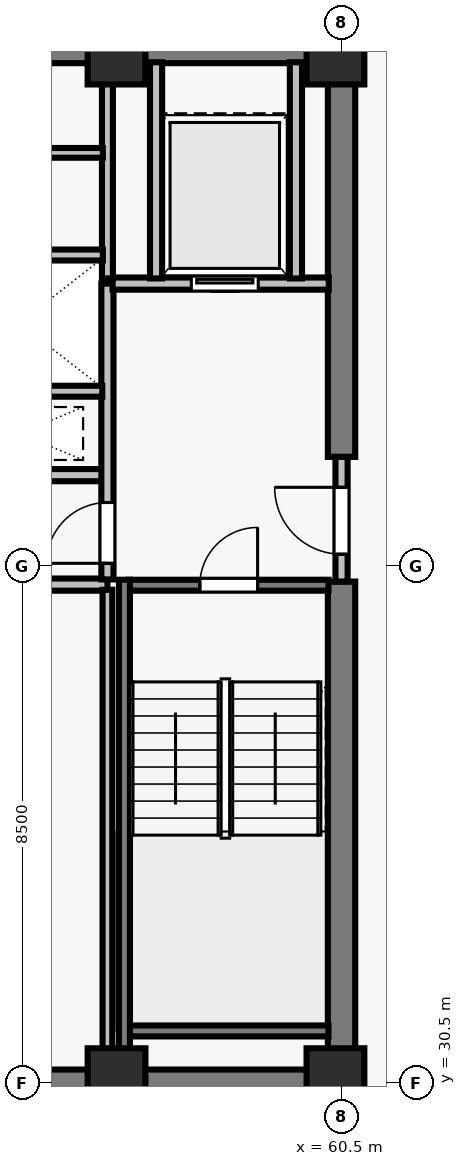
"""IFC4 building model, lengths in metres.
Left out: names, types, materials, properties, quantities, classifications, styles, units other than length and angle.
Written with IfcOpenShell. Run it as: python <this file> out.ifc"""

import sys

from ifc_helpers import new_model, si_unit, direction, frame, frame_2d, origin, origin_2d, place, context, subcontext, project, spatial, rectangle, extrude, element, fill, save


model = new_model("IFC4")
c1 = context("Model", 3, precision=1e-05, world=origin(), true_north=direction((0.0, 1.0)))
c2 = subcontext(c1, "Body", "Model", "MODEL_VIEW")
j1 = project(units=[si_unit("LENGTHUNIT", "METRE"), si_unit("PLANEANGLEUNIT", "RADIAN")], contexts=[c1])
p1 = place(None, origin())
s1 = spatial("IfcSite", under=j1, at=p1, CompositionType="ELEMENT")
p2 = place(p1, origin())
s2 = spatial("IfcBuilding", under=s1, at=p2, CompositionType="ELEMENT")
p3 = place(p2, frame((0.0, 0.0, 255.0)))
s3 = spatial("IfcBuildingStorey", under=s2, at=p3, CompositionType="ELEMENT", Elevation=255.0)
for number, where, z_axis, x_axis in (
    (1, (56.8, 30.6, 0.0), (0.0, 0.0, 1.0), (1.0, 0.0, 0.0)),
    (2, (60.4, 30.6, 0.0), (0.0, 0.0, 1.0), (1.0, 0.0, 0.0)),
    (3, (56.8, 47.4, 0.0), (0.0, 0.0, 1.0), (1.0, 0.0, 0.0)),
    (4, (60.4, 47.4, 0.0), (0.0, 0.0, 1.0), (1.0, 0.0, 0.0)),
):
    element("IfcColumn", number, at=place(p3, frame(where, z_axis=z_axis, x_axis=x_axis)), inside=s3, PredefinedType="COLUMN", context=c2, shape_type="SweptSolid", body=[
        extrude(rectangle(XDim=0.95, YDim=0.95, at=origin_2d()), origin(), (0.0, 0.0, 1.0), 3.5),
    ])
for number, where, z_axis, x_axis in (
    (5, (43.275, 30.5, 0.0), (0.0, 0.0, 1.0), (1.0, 0.0, 0.0)),
    (6, (43.275, 47.5, 0.0), (0.0, 0.0, 1.0), (1.0, 0.0, 0.0)),
):
    element("IfcWall", number, at=place(p3, frame(where, z_axis=z_axis, x_axis=x_axis)), inside=s3, PredefinedType="SHEAR", context=c2, shape_type="SweptSolid", body=[
        extrude(rectangle(XDim=17.45, YDim=0.45, at=frame_2d((8.725, 0.0))), origin(), (0.0, 0.0, 1.0), 3.29),
    ])
p4 = place(p3, frame((60.5, 30.715, 0.0), z_axis=(0.0, 0.0, 1.0), x_axis=(0.0, 1.0, 0.0)))
e7 = element("IfcWall", 7, at=p4, inside=s3, PredefinedType="SHEAR", context=c2, shape_type="SweptSolid", body=[
    extrude(rectangle(XDim=8.035, YDim=0.45, at=frame_2d((4.018, 0.0))), origin(), (0.0, 0.0, 1.0), 3.29),
])
p5 = place(p3, frame((60.5, 40.8, 0.0), z_axis=(0.0, 0.0, 1.0), x_axis=(0.0, 1.0, 0.0)))
e8 = element("IfcWall", 8, at=p5, inside=s3, PredefinedType="SHEAR", context=c2, shape_type="SweptSolid", body=[
    extrude(rectangle(XDim=6.485, YDim=0.45, at=frame_2d((3.242, 0.0))), origin(), (0.0, 0.0, 1.0), 3.29),
])
for number, where, z_axis, x_axis in (
    (9, (53.7, 38.7, 0.0), (0.0, 0.0, 1.0), (1.0, 0.0, 0.0)),
    (10, (53.7, 40.5, 0.0), (0.0, 0.0, 1.0), (1.0, 0.0, 0.0)),
):
    element("IfcWall", number, at=place(p3, frame(where, z_axis=z_axis, x_axis=x_axis)), inside=s3, PredefinedType="SOLIDWALL", context=c2, shape_type="SweptSolid", body=[
        extrude(rectangle(XDim=2.95, YDim=0.2, at=frame_2d((1.475, 0.0))), origin(), (0.0, 0.0, 1.0), 3.29),
    ])
p6 = place(p3, frame((60.5, 38.75, 0.0), z_axis=(0.0, 0.0, 1.0), x_axis=(0.0, 1.0, 0.0)))
e11 = element("IfcWall", 11, at=p6, inside=s3, PredefinedType="SOLIDWALL", context=c2, shape_type="SweptSolid", body=[
    extrude(rectangle(XDim=2.05, YDim=0.2, at=frame_2d((1.025, 0.0))), origin(), (0.0, 0.0, 1.0), 3.29),
])
p7 = place(p6, frame((0.45, 0.0, 0.0)))
e12 = element("IfcOpeningElement", 12, at=p7, cuts=e11, PredefinedType="OPENING", context=c2, shape_type="SweptSolid", body=[
    extrude(rectangle(XDim=1.1, YDim=2.15, at=frame_2d((0.55, 1.075))), frame((0.0, 0.11, 0.0), z_axis=(0.0, -1.0, 0.0), x_axis=(1.0, 0.0, 0.0)), (0.0, 0.0, 1.0), 0.22),
])
p8 = place(p3, frame((56.65, 38.785, 0.0), z_axis=(0.0, 0.0, 1.0), x_axis=(0.0, 1.0, 0.0)))
e13 = element("IfcWall", 13, at=p8, inside=s3, PredefinedType="SOLIDWALL", context=c2, shape_type="SweptSolid", body=[
    extrude(rectangle(XDim=4.865, YDim=0.2, at=frame_2d((2.433, 0.0))), origin(), (0.0, 0.0, 1.0), 3.29),
])
p9 = place(p8, frame((0.265, 0.0, 0.0)))
e14 = element("IfcOpeningElement", 14, at=p9, cuts=e13, PredefinedType="OPENING", context=c2, shape_type="SweptSolid", body=[
    extrude(rectangle(XDim=1.0, YDim=2.15, at=frame_2d((0.5, 1.075))), frame((0.0, 0.11, 0.0), z_axis=(0.0, -1.0, 0.0), x_axis=(1.0, 0.0, 0.0)), (0.0, 0.0, 1.0), 0.22),
])
p10 = place(p3, frame((56.735, 43.65, 0.0), z_axis=(0.0, 0.0, 1.0), x_axis=(1.0, 0.0, 0.0)))
e15 = element("IfcWall", 15, at=p10, inside=s3, PredefinedType="SOLIDWALL", context=c2, shape_type="SweptSolid", body=[
    extrude(rectangle(XDim=3.555, YDim=0.2, at=frame_2d((1.777, 0.0))), origin(), (0.0, 0.0, 1.0), 3.29),
])
p11 = place(p10, frame((1.295, 0.0, 0.0)))
e16 = element("IfcOpeningElement", 16, at=p11, cuts=e15, PredefinedType="OPENING", context=c2, shape_type="SweptSolid", body=[
    extrude(rectangle(XDim=1.1, YDim=2.2, at=frame_2d((0.55, 1.1))), frame((0.0, 0.11, 0.0), z_axis=(0.0, -1.0, 0.0), x_axis=(1.0, 0.0, 0.0)), (0.0, 0.0, 1.0), 0.22),
])
for number, where, z_axis, x_axis in (
    (17, (57.45, 43.735, 0.0), (0.0, 0.0, 1.0), (0.0, 1.0, 0.0)),
    (18, (59.75, 43.735, 0.0), (0.0, 0.0, 1.0), (0.0, 1.0, 0.0)),
):
    element("IfcWall", number, at=place(p3, frame(where, z_axis=z_axis, x_axis=x_axis)), inside=s3, PredefinedType="SOLIDWALL", context=c2, shape_type="SweptSolid", body=[
        extrude(rectangle(XDim=3.555, YDim=0.2, at=frame_2d((1.777, 0.0))), origin(), (0.0, 0.0, 1.0), 3.29),
    ])
p12 = place(p3, frame((56.65, 30.71, 0.0), z_axis=(0.0, 0.0, 1.0), x_axis=(0.0, 1.0, 0.0)))
e19 = element("IfcWall", 19, at=p12, inside=s3, PredefinedType="PARTITIONING", context=c2, shape_type="SweptSolid", body=[
    extrude(rectangle(XDim=7.905, YDim=0.16, at=frame_2d((3.953, 0.0))), origin(), (0.0, 0.0, 1.0), 3.29),
])
p13 = place(p3, frame((56.65, 43.735, 0.0), z_axis=(0.0, 0.0, 1.0), x_axis=(0.0, 1.0, 0.0)))
e20 = element("IfcWall", 20, at=p13, inside=s3, PredefinedType="SOLIDWALL", context=c2, shape_type="SweptSolid", body=[
    extrude(rectangle(XDim=3.555, YDim=0.18, at=frame_2d((1.777, 0.0))), origin(), (0.0, 0.0, 1.0), 3.29),
])
p14 = place(p3, frame((53.785, 41.88, 0.0), z_axis=(0.0, 0.0, 1.0), x_axis=(1.0, 0.0, 0.0)))
e21 = element("IfcWall", 21, at=p14, inside=s3, PredefinedType="SOLIDWALL", context=c2, shape_type="SweptSolid", body=[
    extrude(rectangle(XDim=2.78, YDim=0.18, at=frame_2d((1.39, 0.0))), origin(), (0.0, 0.0, 1.0), 3.29),
])
p15 = place(p3, frame((53.785, 44.12, 0.0), z_axis=(0.0, 0.0, 1.0), x_axis=(1.0, 0.0, 0.0)))
e22 = element("IfcWall", 22, at=p15, inside=s3, PredefinedType="SOLIDWALL", context=c2, shape_type="SweptSolid", body=[
    extrude(rectangle(XDim=2.79, YDim=0.18, at=frame_2d((1.395, 0.0))), origin(), (0.0, 0.0, 1.0), 3.29),
])
p16 = place(p3, frame((53.785, 45.8, 0.0), z_axis=(0.0, 0.0, 1.0), x_axis=(1.0, 0.0, 0.0)))
e23 = element("IfcWall", 23, at=p16, inside=s3, PredefinedType="PARTITIONING", context=c2, shape_type="SweptSolid", body=[
    extrude(rectangle(XDim=2.79, YDim=0.16, at=frame_2d((1.395, 0.0))), origin(), (0.0, 0.0, 1.0), 3.29),
])
p17 = place(p3, frame((57.005, 38.69, 0.0), z_axis=(0.0, 0.0, 1.0), x_axis=(1.0, 0.0, 0.0)))
e24 = element("IfcWall", 24, at=p17, inside=s3, PredefinedType="SOLIDWALL", context=c2, shape_type="SweptSolid", body=[
    extrude(rectangle(XDim=3.28, YDim=0.18, at=frame_2d((1.64, 0.0))), origin(), (0.0, 0.0, 1.0), 3.29),
])
p18 = place(p17, frame((1.165, 0.0, 0.0)))
e25 = element("IfcOpeningElement", 25, at=p18, cuts=e24, PredefinedType="OPENING", context=c2, shape_type="SweptSolid", body=[
    extrude(rectangle(XDim=0.95, YDim=2.15, at=frame_2d((0.475, 1.075))), frame((0.0, 0.1, 0.0), z_axis=(0.0, -1.0, 0.0), x_axis=(1.0, 0.0, 0.0)), (0.0, 0.0, 1.0), 0.2),
])
p19 = place(p3, frame((57.005, 31.36, 0.0), z_axis=(0.0, 0.0, 1.0), x_axis=(1.0, 0.0, 0.0)))
e26 = element("IfcWall", 26, at=p19, inside=s3, PredefinedType="SOLIDWALL", context=c2, shape_type="SweptSolid", body=[
    extrude(rectangle(XDim=3.28, YDim=0.18, at=frame_2d((1.64, 0.0))), origin(), (0.0, 0.0, 1.0), 3.29),
])
p20 = place(p3, frame((56.93, 38.78, 0.0), z_axis=(0.0, 0.0, 1.0), x_axis=(0.0, -1.0, 0.0)))
e27 = element("IfcWall", 27, at=p20, inside=s3, PredefinedType="SOLIDWALL", context=c2, shape_type="SweptSolid", body=[
    extrude(rectangle(XDim=8.067, YDim=0.18, at=frame_2d((4.034, 0.0))), origin(), (0.0, 0.0, 1.0), 3.29),
])
p21 = place(p7, origin())
e28 = element("IfcDoor", 28, at=p21, inside=s3, OperationType="SINGLE_SWING_RIGHT", PredefinedType="DOOR", context=c2, shape_type="SweptSolid", body=[
    extrude(rectangle(XDim=1.1, YDim=2.15, at=frame_2d((0.55, 1.075))), frame((0.0, 0.025, 0.0), z_axis=(0.0, -1.0, 0.0), x_axis=(1.0, 0.0, 0.0)), (0.0, 0.0, 1.0), 0.05),
])
fill(e12, e28)
p22 = place(p9, origin())
e29 = element("IfcDoor", 29, at=p22, inside=s3, OperationType="SINGLE_SWING_LEFT", PredefinedType="DOOR", context=c2, shape_type="SweptSolid", body=[
    extrude(rectangle(XDim=1.0, YDim=2.15, at=frame_2d((0.5, 1.075))), frame((0.0, 0.025, 0.0), z_axis=(0.0, -1.0, 0.0), x_axis=(1.0, 0.0, 0.0)), (0.0, 0.0, 1.0), 0.05),
])
fill(e14, e29)
p23 = place(p11, origin())
e30 = element("IfcDoor", 30, at=p23, inside=s3, OperationType="SLIDING_TO_LEFT", PredefinedType="DOOR", context=c2, shape_type="SweptSolid", body=[
    extrude(rectangle(XDim=1.1, YDim=2.2, at=frame_2d((0.55, 1.1))), frame((0.0, 0.025, 0.0), z_axis=(0.0, -1.0, 0.0), x_axis=(1.0, 0.0, 0.0)), (0.0, 0.0, 1.0), 0.05),
])
fill(e16, e30)
p24 = place(p18, origin())
e31 = element("IfcDoor", 31, at=p24, inside=s3, OperationType="SINGLE_SWING_RIGHT", PredefinedType="DOOR", context=c2, shape_type="SweptSolid", body=[
    extrude(rectangle(XDim=0.95, YDim=2.15, at=frame_2d((0.475, 1.075))), frame((0.0, 0.025, 0.0), z_axis=(0.0, -1.0, 0.0), x_axis=(1.0, 0.0, 0.0)), (0.0, 0.0, 1.0), 0.05),
])
fill(e25, e31)
save(model, sys.argv[1])
